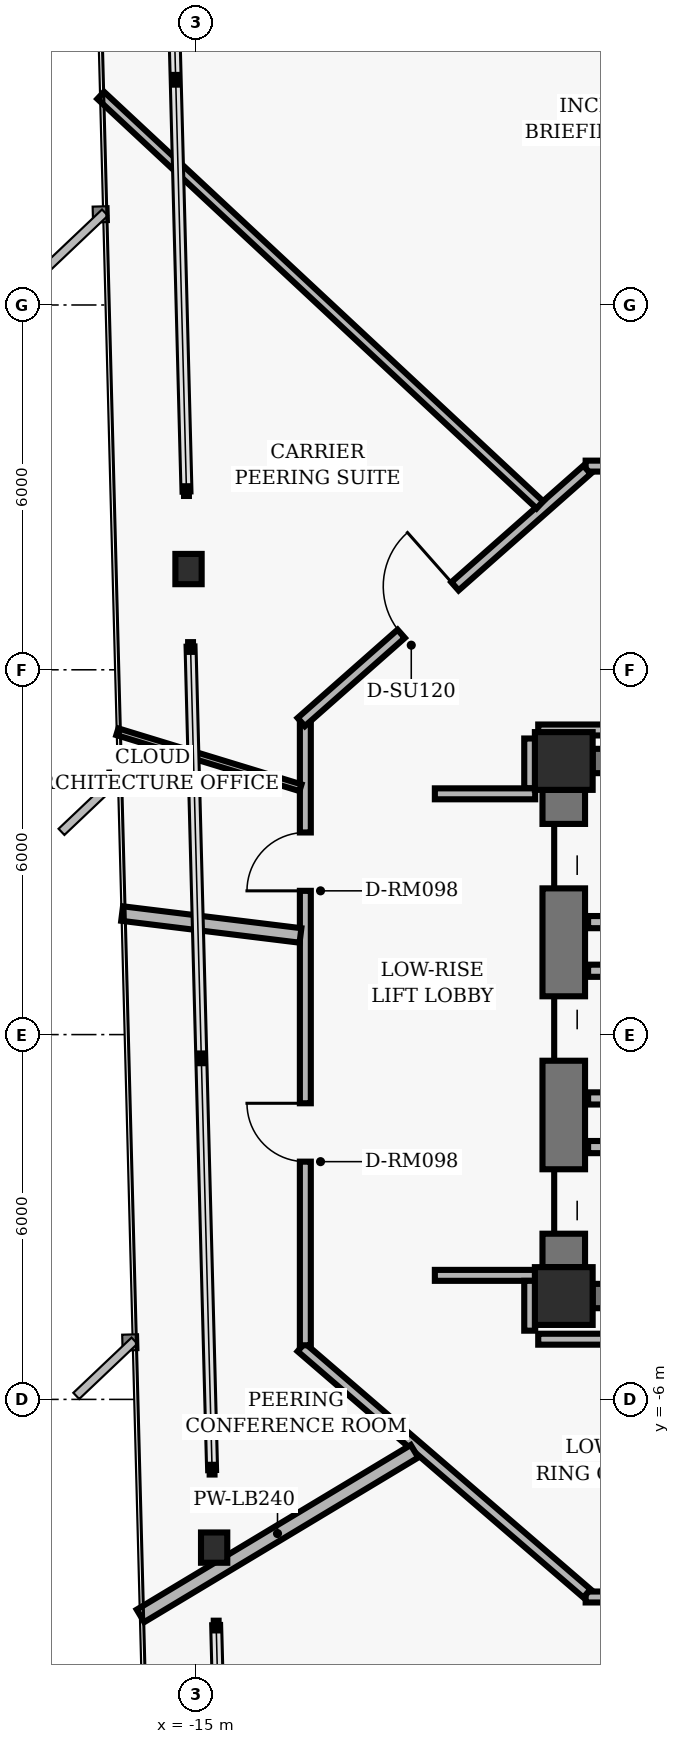
"""IFC4 building model, lengths in metres.
Left out: names, types, materials, properties, quantities, classifications, styles, units other than length and angle.
Written with IfcOpenShell. Run it as: python <this file> out.ifc"""

import sys

from ifc_helpers import new_model, si_unit, direction, frame, frame_2d, origin, origin_2d, place, context, subcontext, project, spatial, rectangle, hollow_rectangle, i_section, extrude, element, fill, save


model = new_model("IFC4")
c1 = context("Model", 3, precision=1e-05, world=origin(), true_north=direction((0.0, 1.0)))
c2 = subcontext(c1, "Body", "Model", "MODEL_VIEW")
j1 = project(units=[si_unit("LENGTHUNIT", "METRE"), si_unit("PLANEANGLEUNIT", "RADIAN")], contexts=[c1])
p1 = place(None, origin())
s1 = spatial("IfcSite", under=j1, at=p1, CompositionType="ELEMENT")
p2 = place(p1, origin())
s2 = spatial("IfcBuilding", under=s1, at=p2, CompositionType="ELEMENT")
p3 = place(p2, frame((0.0, 0.0, 28.96)))
s3 = spatial("IfcBuildingStorey", under=s2, at=p3, CompositionType="ELEMENT", Elevation=28.96)
for number, where, z_axis, x_axis in (
    (1, (-8.95, 4.5, 0.0), (0.0, 0.0, 1.0), (1.0, 0.0, 0.0)),
    (2, (-8.95, -4.3, 0.0), (0.0, 0.0, 1.0), (1.0, 0.0, 0.0)),
):
    element("IfcColumn", number, at=place(p3, frame(where, z_axis=z_axis, x_axis=x_axis)), inside=s3, PredefinedType="COLUMN", context=c2, shape_type="SweptSolid", body=[
        extrude(hollow_rectangle(XDim=0.95, YDim=0.95, WallThickness=0.06, InnerFilletRadius=0.02, OuterFilletRadius=0.04, at=origin_2d()), origin(), (0.0, 0.0, 1.0), 3.36),
    ])
p4 = place(p3, frame((-8.95, -3.825, 0.0), z_axis=(0.0, 0.0, 1.0), x_axis=(0.0, 1.0, 0.0)))
e3 = element("IfcWall", 3, at=p4, inside=s3, PredefinedType="SHEAR", context=c2, shape_type="SweptSolid", body=[
    extrude(rectangle(XDim=7.85, YDim=0.7, at=frame_2d((3.925, 0.0))), origin(), (0.0, 0.0, 1.0), 3.098),
])
p5 = place(p4, frame((0.55, 0.0, 0.0)))
e4 = element("IfcOpeningElement", 4, at=p5, cuts=e3, PredefinedType="OPENING", context=c2, shape_type="SweptSolid", body=[
    extrude(rectangle(XDim=1.06, YDim=2.04, at=frame_2d((0.53, 1.02))), frame((0.0, 0.36, 0.0), z_axis=(0.0, -1.0, 0.0), x_axis=(1.0, 0.0, 0.0)), (0.0, 0.0, 1.0), 0.72),
])
p6 = place(p4, frame((3.395, 0.0, 0.0)))
e5 = element("IfcOpeningElement", 5, at=p6, cuts=e3, PredefinedType="OPENING", context=c2, shape_type="SweptSolid", body=[
    extrude(rectangle(XDim=1.06, YDim=2.04, at=frame_2d((0.53, 1.02))), frame((0.0, 0.36, 0.0), z_axis=(0.0, -1.0, 0.0), x_axis=(1.0, 0.0, 0.0)), (0.0, 0.0, 1.0), 0.72),
])
p7 = place(p4, frame((6.23, 0.0, 0.0)))
e6 = element("IfcOpeningElement", 6, at=p7, cuts=e3, PredefinedType="OPENING", context=c2, shape_type="SweptSolid", body=[
    extrude(rectangle(XDim=1.06, YDim=2.04, at=frame_2d((0.53, 1.02))), frame((0.0, 0.36, 0.0), z_axis=(0.0, -1.0, 0.0), x_axis=(1.0, 0.0, 0.0)), (0.0, 0.0, 1.0), 0.72),
])
for number, where, z_axis, x_axis in (
    (7, (-8.475, 4.5, 0.0), (0.0, 0.0, 1.0), (1.0, 0.0, 0.0)),
    (8, (-8.475, -4.3, 0.0), (0.0, 0.0, 1.0), (1.0, 0.0, 0.0)),
):
    element("IfcWall", number, at=place(p3, frame(where, z_axis=z_axis, x_axis=x_axis)), inside=s3, PredefinedType="SHEAR", context=c2, shape_type="SweptSolid", body=[
        extrude(rectangle(XDim=1.95, YDim=0.4, at=frame_2d((0.975, 0.0))), origin(), (0.0, 0.0, 1.0), 3.098),
    ])
for number, where, z_axis, x_axis in (
    (9, (-15.121, 7.657, 0.0), (0.0, 0.0, 1.0), (1.0, 0.0, 0.0)),
    (10, (-14.7, -8.438, 0.0), (0.0, 0.0, 1.0), (1.0, 0.0, 0.0)),
):
    element("IfcColumn", number, at=place(p3, frame(where, z_axis=z_axis, x_axis=x_axis)), inside=s3, PredefinedType="COLUMN", context=c2, shape_type="SweptSolid", body=[
        extrude(i_section(OverallWidth=0.432, OverallDepth=0.498, WebThickness=0.056, FlangeThickness=0.089, FilletRadius=0.025, at=origin_2d()), origin(), (0.0, 0.0, 1.0), 3.36),
    ])
for number, where, z_axis, x_axis in (
    (11, (-8.55, -1.85, 0.0), (0.0, 0.0, 1.0), (1.0, 0.0, 0.0)),
    (12, (-8.55, 1.85, 0.0), (0.0, 0.0, 1.0), (1.0, 0.0, 0.0)),
):
    element("IfcWall", number, at=place(p3, frame(where, z_axis=z_axis, x_axis=x_axis)), inside=s3, PredefinedType="PARTITIONING", context=c2, shape_type="SweptSolid", body=[
        extrude(rectangle(XDim=2.1, YDim=0.2, at=frame_2d((1.05, 0.0))), origin(), (0.0, 0.0, 1.0), 3.073),
    ])
for number, where, z_axis, x_axis in (
    (13, (-8.55, -1.05, 0.0), (0.0, 0.0, 1.0), (1.0, 0.0, 0.0)),
    (14, (-8.55, 1.05, 0.0), (0.0, 0.0, 1.0), (1.0, 0.0, 0.0)),
):
    element("IfcWall", number, at=place(p3, frame(where, z_axis=z_axis, x_axis=x_axis)), inside=s3, PredefinedType="PARTITIONING", context=c2, shape_type="SweptSolid", body=[
        extrude(rectangle(XDim=1.91, YDim=0.2, at=frame_2d((0.955, 0.0))), origin(), (0.0, 0.0, 1.0), 3.073),
    ])
p8 = place(p3, frame((-8.59, 9.35, 0.0), z_axis=(0.0, 0.0, 1.0), x_axis=(1.0, 0.0, 0.0)))
e15 = element("IfcWall", 15, at=p8, inside=s3, PredefinedType="PARTITIONING", context=c2, shape_type="SweptSolid", body=[
    extrude(rectangle(XDim=17.18, YDim=0.18, at=frame_2d((8.59, 0.0))), origin(), (0.0, 0.0, 1.0), 2.587),
])
p9 = place(p8, frame((10.43, 0.0, 0.0)))
e16 = element("IfcOpeningElement", 16, at=p9, cuts=e15, PredefinedType="OPENING", context=c2, shape_type="SweptSolid", body=[
    extrude(rectangle(XDim=0.96, YDim=2.02, at=frame_2d((0.48, 1.01))), frame((0.0, 0.1, 0.0), z_axis=(0.0, -1.0, 0.0), x_axis=(1.0, 0.0, 0.0)), (0.0, 0.0, 1.0), 0.2),
])
p10 = place(p8, frame((3.198, 0.0, 0.0)))
e17 = element("IfcOpeningElement", 17, at=p10, cuts=e15, PredefinedType="OPENING", context=c2, shape_type="SweptSolid", body=[
    extrude(rectangle(XDim=0.96, YDim=2.02, at=frame_2d((0.48, 1.01))), frame((0.0, 0.1, 0.0), z_axis=(0.0, -1.0, 0.0), x_axis=(1.0, 0.0, 0.0)), (0.0, 0.0, 1.0), 0.2),
])
p11 = place(p3, frame((8.41, -9.25, 0.0), z_axis=(0.0, 0.0, 1.0), x_axis=(-1.0, 0.0, 0.0)))
e18 = element("IfcWall", 18, at=p11, inside=s3, PredefinedType="PARTITIONING", context=c2, shape_type="SweptSolid", body=[
    extrude(rectangle(XDim=17.0, YDim=0.18, at=frame_2d((8.5, 0.0))), origin(), (0.0, 0.0, 1.0), 2.587),
])
p12 = place(p11, frame((13.703, 0.0, 0.0)))
e19 = element("IfcOpeningElement", 19, at=p12, cuts=e18, PredefinedType="OPENING", context=c2, shape_type="SweptSolid", body=[
    extrude(rectangle(XDim=0.96, YDim=2.02, at=frame_2d((0.48, 1.01))), frame((0.0, 0.1, 0.0), z_axis=(0.0, -1.0, 0.0), x_axis=(1.0, 0.0, 0.0)), (0.0, 0.0, 1.0), 0.2),
])
p13 = place(p11, frame((7.745, 0.0, 0.0)))
e20 = element("IfcOpeningElement", 20, at=p13, cuts=e18, PredefinedType="OPENING", context=c2, shape_type="SweptSolid", body=[
    extrude(rectangle(XDim=0.96, YDim=2.02, at=frame_2d((0.48, 1.01))), frame((0.0, 0.1, 0.0), z_axis=(0.0, -1.0, 0.0), x_axis=(1.0, 0.0, 0.0)), (0.0, 0.0, 1.0), 0.2),
])
p14 = place(p3, frame((-8.568, -9.191, 0.0), z_axis=(0.0, 0.0, 1.0), x_axis=(-0.757556899173, 0.652769135694, 0.0)))
e21 = element("IfcWall", 21, at=p14, inside=s3, PredefinedType="PARTITIONING", context=c2, shape_type="SweptSolid", body=[
    extrude(rectangle(XDim=6.204, YDim=0.18, at=frame_2d((3.102, 0.0))), origin(), (0.0, 0.0, 1.0), 3.073),
])
p15 = place(p3, frame((-13.2, -5.11, 0.0), z_axis=(0.0, 0.0, 1.0), x_axis=(0.0, 1.0, 0.0)))
e22 = element("IfcWall", 22, at=p15, inside=s3, PredefinedType="PARTITIONING", context=c2, shape_type="SweptSolid", body=[
    extrude(rectangle(XDim=10.22, YDim=0.18, at=frame_2d((5.11, 0.0))), origin(), (0.0, 0.0, 1.0), 2.587),
])
p16 = place(p15, frame((3.02, 0.0, 0.0)))
e23 = element("IfcOpeningElement", 23, at=p16, cuts=e22, PredefinedType="OPENING", context=c2, shape_type="SweptSolid", body=[
    extrude(rectangle(XDim=0.96, YDim=2.02, at=frame_2d((0.48, 1.01))), frame((0.0, 0.1, 0.0), z_axis=(0.0, -1.0, 0.0), x_axis=(1.0, 0.0, 0.0)), (0.0, 0.0, 1.0), 0.2),
])
p17 = place(p15, frame((7.474, 0.0, 0.0)))
e24 = element("IfcOpeningElement", 24, at=p17, cuts=e22, PredefinedType="OPENING", context=c2, shape_type="SweptSolid", body=[
    extrude(rectangle(XDim=0.96, YDim=2.02, at=frame_2d((0.48, 1.01))), frame((0.0, 0.1, 0.0), z_axis=(0.0, -1.0, 0.0), x_axis=(1.0, 0.0, 0.0)), (0.0, 0.0, 1.0), 0.2),
])
p18 = place(p3, frame((-13.268, 5.14, 0.0), z_axis=(0.0, 0.0, 1.0), x_axis=(0.749626463267, 0.66186113768, 0.0)))
e25 = element("IfcWall", 25, at=p18, inside=s3, PredefinedType="PARTITIONING", context=c2, shape_type="SweptSolid", body=[
    extrude(rectangle(XDim=6.27, YDim=0.18, at=frame_2d((3.135, 0.0))), origin(), (0.0, 0.0, 1.0), 3.073),
])
p19 = place(p18, frame((2.193, 0.0, 0.0)))
e26 = element("IfcOpeningElement", 26, at=p19, cuts=e25, PredefinedType="OPENING", context=c2, shape_type="SweptSolid", body=[
    extrude(rectangle(XDim=1.18, YDim=2.02, at=frame_2d((0.59, 1.01))), frame((0.0, 0.1, 0.0), z_axis=(0.0, -1.0, 0.0), x_axis=(1.0, 0.0, 0.0)), (0.0, 0.0, 1.0), 0.2),
])
p20 = place(p3, frame((-9.51, 4.87, 0.0), z_axis=(0.0, 0.0, 1.0), x_axis=(0.0, -1.0, 0.0)))
e27 = element("IfcWall", 27, at=p20, inside=s3, PredefinedType="PARTITIONING", context=c2, shape_type="SweptSolid", body=[
    extrude(rectangle(XDim=0.82, YDim=0.18, at=frame_2d((0.41, 0.0))), origin(), (0.0, 0.0, 1.0), 3.073),
])
for number, where, z_axis, x_axis in (
    (28, (-9.42, 3.96, 0.0), (0.0, 0.0, 1.0), (-1.0, 0.0, 0.0)),
    (29, (-11.07, -3.96, 0.0), (0.0, 0.0, 1.0), (1.0, 0.0, 0.0)),
):
    element("IfcWall", number, at=place(p3, frame(where, z_axis=z_axis, x_axis=x_axis)), inside=s3, PredefinedType="PARTITIONING", context=c2, shape_type="SweptSolid", body=[
        extrude(rectangle(XDim=1.65, YDim=0.18, at=frame_2d((0.825, 0.0))), origin(), (0.0, 0.0, 1.0), 3.073),
    ])
p21 = place(p3, frame((-9.51, -4.05, 0.0), z_axis=(0.0, 0.0, 1.0), x_axis=(0.0, -1.0, 0.0)))
e30 = element("IfcWall", 30, at=p21, inside=s3, PredefinedType="PARTITIONING", context=c2, shape_type="SweptSolid", body=[
    extrude(rectangle(XDim=0.82, YDim=0.18, at=frame_2d((0.41, 0.0))), origin(), (0.0, 0.0, 1.0), 2.358),
])
p22 = place(p3, frame((-9.37, -5.01, 0.0), z_axis=(0.0, 0.0, 1.0), x_axis=(1.0, 0.0, 0.0)))
e31 = element("IfcWall", 31, at=p22, inside=s3, PredefinedType="PARTITIONING", context=c2, shape_type="SweptSolid", body=[
    extrude(rectangle(XDim=3.34, YDim=0.18, at=frame_2d((1.67, 0.0))), origin(), (0.0, 0.0, 1.0), 3.073),
])
p23 = place(p3, frame((-6.562, 5.01, 0.0), z_axis=(0.0, 0.0, 1.0), x_axis=(-1.0, 0.0, 0.0)))
e32 = element("IfcWall", 32, at=p23, inside=s3, PredefinedType="PARTITIONING", context=c2, shape_type="SweptSolid", body=[
    extrude(rectangle(XDim=2.808, YDim=0.18, at=frame_2d((1.404, 0.0))), origin(), (0.0, 0.0, 1.0), 3.073),
])
p24 = place(p3, frame((-11.405, -6.853, 0.0), z_axis=(0.0, 0.0, 1.0), x_axis=(-0.857148529273, -0.515069314524, 0.0)))
e33 = element("IfcWall", 33, at=p24, inside=s3, PredefinedType="PARTITIONING", context=c2, shape_type="SweptSolid", body=[
    extrude(rectangle(XDim=5.257, YDim=0.24, at=frame_2d((2.628, 0.0))), origin(), (0.0, 0.0, 1.0), 2.358),
])
p25 = place(p3, frame((-9.343, 8.712, 0.0), z_axis=(0.0, 0.0, 1.0), x_axis=(-0.731347028882, 0.682005515627, 0.0)))
e34 = element("IfcWall", 34, at=p25, inside=s3, PredefinedType="PARTITIONING", context=c2, shape_type="SweptSolid", body=[
    extrude(rectangle(XDim=9.876, YDim=0.16, at=frame_2d((4.938, 0.0))), origin(), (0.0, 0.0, 1.0), 3.073),
])
p26 = place(p3, frame((-13.28, 4.06, 0.0), z_axis=(0.0, 0.0, 1.0), x_axis=(-0.956293781209, 0.292407599118, 0.0)))
e35 = element("IfcWall", 35, at=p26, inside=s3, PredefinedType="MOVABLE", context=c2, shape_type="SweptSolid", body=[
    extrude(rectangle(XDim=3.149, YDim=0.115, at=frame_2d((1.575, 0.0))), origin(), (0.0, 0.0, 1.0), 3.073),
])
p27 = place(p3, frame((-13.28, 1.631, 0.0), z_axis=(0.0, 0.0, 1.0), x_axis=(-0.992548714485, 0.121848468903, 0.0)))
e36 = element("IfcWall", 36, at=p27, inside=s3, PredefinedType="PARTITIONING", context=c2, shape_type="SweptSolid", body=[
    extrude(rectangle(XDim=2.955, YDim=0.24, at=frame_2d((1.478, 0.0))), origin(), (0.0, 0.0, 1.0), 3.073),
])
p28 = place(p5, origin())
e37 = element("IfcDoor", 37, at=p28, inside=s3, OperationType="SLIDING_TO_LEFT", PredefinedType="DOOR", context=c2, shape_type="SweptSolid", body=[
    extrude(rectangle(XDim=1.06, YDim=2.04, at=frame_2d((0.53, 1.02))), frame((0.0, 0.025, 0.0), z_axis=(0.0, -1.0, 0.0), x_axis=(1.0, 0.0, 0.0)), (0.0, 0.0, 1.0), 0.05),
])
fill(e4, e37)
p29 = place(p6, origin())
e38 = element("IfcDoor", 38, at=p29, inside=s3, OperationType="SLIDING_TO_RIGHT", PredefinedType="DOOR", context=c2, shape_type="SweptSolid", body=[
    extrude(rectangle(XDim=1.06, YDim=2.04, at=frame_2d((0.53, 1.02))), frame((0.0, 0.025, 0.0), z_axis=(0.0, -1.0, 0.0), x_axis=(1.0, 0.0, 0.0)), (0.0, 0.0, 1.0), 0.05),
])
fill(e5, e38)
p30 = place(p7, origin())
e39 = element("IfcDoor", 39, at=p30, inside=s3, OperationType="SLIDING_TO_LEFT", PredefinedType="DOOR", context=c2, shape_type="SweptSolid", body=[
    extrude(rectangle(XDim=1.06, YDim=2.04, at=frame_2d((0.53, 1.02))), frame((0.0, 0.025, 0.0), z_axis=(0.0, -1.0, 0.0), x_axis=(1.0, 0.0, 0.0)), (0.0, 0.0, 1.0), 0.05),
])
fill(e6, e39)
p31 = place(p16, origin())
e40 = element("IfcDoor", 40, at=p31, inside=s3, OperationType="SINGLE_SWING_RIGHT", PredefinedType="DOOR", context=c2, shape_type="SweptSolid", body=[
    extrude(rectangle(XDim=0.96, YDim=2.02, at=frame_2d((0.48, 1.01))), frame((0.0, 0.025, 0.0), z_axis=(0.0, -1.0, 0.0), x_axis=(1.0, 0.0, 0.0)), (0.0, 0.0, 1.0), 0.05),
])
fill(e23, e40)
p32 = place(p19, origin())
e41 = element("IfcDoor", 41, at=p32, inside=s3, OperationType="SINGLE_SWING_RIGHT", PredefinedType="DOOR", context=c2, shape_type="SweptSolid", body=[
    extrude(rectangle(XDim=1.18, YDim=2.02, at=frame_2d((0.59, 1.01))), frame((0.0, 0.025, 0.0), z_axis=(0.0, -1.0, 0.0), x_axis=(1.0, 0.0, 0.0)), (0.0, 0.0, 1.0), 0.05),
])
fill(e26, e41)
p33 = place(p17, origin())
e42 = element("IfcDoor", 42, at=p33, inside=s3, OperationType="SINGLE_SWING_LEFT", PredefinedType="DOOR", context=c2, shape_type="SweptSolid", body=[
    extrude(rectangle(XDim=0.96, YDim=2.02, at=frame_2d((0.48, 1.01))), frame((0.0, 0.025, 0.0), z_axis=(0.0, -1.0, 0.0), x_axis=(1.0, 0.0, 0.0)), (0.0, 0.0, 1.0), 0.05),
])
fill(e24, e42)
save(model, sys.argv[1])
